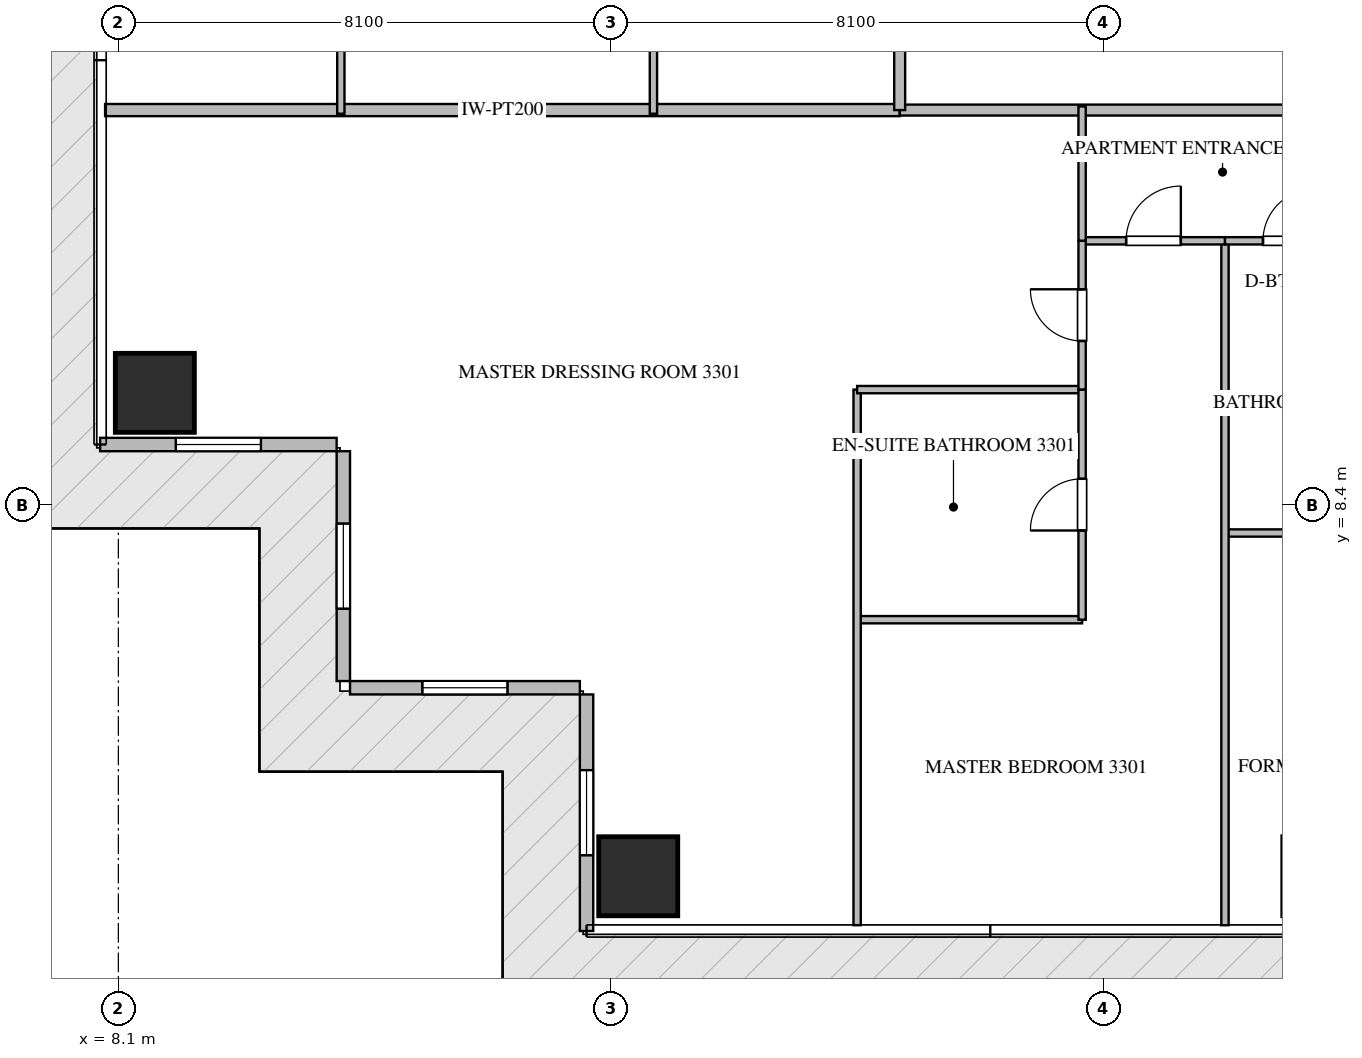
"""IFC4 building model, lengths in metres.
Left out: names, types, materials, properties, quantities, classifications, styles, units other than length and angle.
Written with IfcOpenShell. Run it as: python <this file> out.ifc"""

import sys

from ifc_helpers import new_model, si_unit, direction, frame, frame_2d, origin, origin_2d, place, context, subcontext, project, spatial, rectangle, extrude, source, transform, mapped, element, fill, save


model = new_model("IFC4")
c1 = context("Model", 3, precision=1e-05, world=origin(), true_north=direction((0.0, 1.0)))
c2 = subcontext(c1, "Body", "Model", "MODEL_VIEW")
j1 = project(units=[si_unit("LENGTHUNIT", "METRE"), si_unit("PLANEANGLEUNIT", "RADIAN")], contexts=[c1])
p1 = place(None, origin())
s1 = spatial("IfcSite", under=j1, at=p1, CompositionType="ELEMENT")
p2 = place(p1, origin())
s2 = spatial("IfcBuilding", under=s1, at=p2, CompositionType="ELEMENT")
p3 = place(p2, frame((0.0, 0.0, 135.15)))
s3 = spatial("IfcBuildingStorey", under=s2, at=p3, CompositionType="ELEMENT", Elevation=135.15)
m1 = source(origin(), c2, "Body", "SweptSolid", [
    extrude(rectangle(XDim=1.3, YDim=1.3, at=origin_2d()), origin(), (0.0, 0.0, 1.0), 3.75),
])
for number, where, z_axis, x_axis in (
    (1, (16.65, 2.3, -0.26), (0.0, 0.0, 1.0), (1.0, 0.0, 0.0)),
    (2, (8.7, 10.25, -0.26), (0.0, 0.0, 1.0), (1.0, 0.0, 0.0)),
):
    element("IfcColumn", number, at=place(p3, frame(where, z_axis=z_axis, x_axis=x_axis)), inside=s3, PredefinedType="COLUMN", context=c2, shape_type="MappedRepresentation", body=[
        mapped(m1, transform((0.0, 0.0, 0.0), scale=1.0)),
    ])
p4 = place(p3, frame((7.8, 9.4, 0.0), z_axis=(0.0, 0.0, 1.0), x_axis=(1.0, 0.0, 0.0)))
e3 = element("IfcWall", 3, at=p4, inside=s3, PredefinedType="ELEMENTEDWALL", context=c2, shape_type="SweptSolid", body=[
    extrude(rectangle(XDim=3.89, YDim=0.22, at=frame_2d((1.945, 0.0))), origin(), (0.0, 0.0, 1.0), 3.475),
])
p5 = place(p4, frame((1.245, 0.0, 0.65)))
e4 = element("IfcOpeningElement", 4, at=p5, cuts=e3, PredefinedType="OPENING", context=c2, shape_type="SweptSolid", body=[
    extrude(rectangle(XDim=1.4, YDim=2.05, at=frame_2d((0.7, 1.025))), frame((0.0, 0.12, 0.0), z_axis=(0.0, -1.0, 0.0), x_axis=(1.0, 0.0, 0.0)), (0.0, 0.0, 1.0), 0.24),
])
p6 = place(p3, frame((11.8, 9.29, 0.0), z_axis=(0.0, 0.0, 1.0), x_axis=(0.0, -1.0, 0.0)))
e5 = element("IfcWall", 5, at=p6, inside=s3, PredefinedType="ELEMENTEDWALL", context=c2, shape_type="SweptSolid", body=[
    extrude(rectangle(XDim=3.78, YDim=0.22, at=frame_2d((1.89, 0.0))), origin(), (0.0, 0.0, 1.0), 3.475),
])
p7 = place(p6, frame((1.19, 0.0, 0.65)))
e6 = element("IfcOpeningElement", 6, at=p7, cuts=e5, PredefinedType="OPENING", context=c2, shape_type="SweptSolid", body=[
    extrude(rectangle(XDim=1.4, YDim=2.05, at=frame_2d((0.7, 1.025))), frame((0.0, 0.12, 0.0), z_axis=(0.0, -1.0, 0.0), x_axis=(1.0, 0.0, 0.0)), (0.0, 0.0, 1.0), 0.24),
])
p8 = place(p3, frame((11.91, 5.4, 0.0), z_axis=(0.0, 0.0, 1.0), x_axis=(1.0, 0.0, 0.0)))
e7 = element("IfcWall", 7, at=p8, inside=s3, PredefinedType="ELEMENTEDWALL", context=c2, shape_type="SweptSolid", body=[
    extrude(rectangle(XDim=3.78, YDim=0.22, at=frame_2d((1.89, 0.0))), origin(), (0.0, 0.0, 1.0), 3.475),
])
p9 = place(p8, frame((1.19, 0.0, 0.65)))
e8 = element("IfcOpeningElement", 8, at=p9, cuts=e7, PredefinedType="OPENING", context=c2, shape_type="SweptSolid", body=[
    extrude(rectangle(XDim=1.4, YDim=2.05, at=frame_2d((0.7, 1.025))), frame((0.0, 0.12, 0.0), z_axis=(0.0, -1.0, 0.0), x_axis=(1.0, 0.0, 0.0)), (0.0, 0.0, 1.0), 0.24),
])
p10 = place(p3, frame((15.8, 5.29, 0.0), z_axis=(0.0, 0.0, 1.0), x_axis=(0.0, -1.0, 0.0)))
e9 = element("IfcWall", 9, at=p10, inside=s3, PredefinedType="ELEMENTEDWALL", context=c2, shape_type="SweptSolid", body=[
    extrude(rectangle(XDim=3.89, YDim=0.22, at=frame_2d((1.945, 0.0))), origin(), (0.0, 0.0, 1.0), 3.475),
])
p11 = place(p10, frame((1.245, 0.0, 0.65)))
e10 = element("IfcOpeningElement", 10, at=p11, cuts=e9, PredefinedType="OPENING", context=c2, shape_type="SweptSolid", body=[
    extrude(rectangle(XDim=1.4, YDim=2.05, at=frame_2d((0.7, 1.025))), frame((0.0, 0.12, 0.0), z_axis=(0.0, -1.0, 0.0), x_axis=(1.0, 0.0, 0.0)), (0.0, 0.0, 1.0), 0.24),
])
p12 = place(p3, frame((7.882, 14.9, 0.0), z_axis=(0.0, 0.0, 1.0), x_axis=(1.0, 0.0, 0.0)))
e11 = element("IfcWall", 11, at=p12, inside=s3, PredefinedType="PARTITIONING", context=c2, shape_type="SweptSolid", body=[
    extrude(rectangle(XDim=13.068, YDim=0.2, at=frame_2d((6.534, 0.0))), origin(), (0.0, 0.0, 1.0), 3.49),
])
p13 = place(p3, frame((20.952, 14.9, 0.0), z_axis=(0.0, 0.0, 1.0), x_axis=(1.0, 0.0, 0.0)))
e12 = element("IfcWall", 12, at=p13, inside=s3, PredefinedType="PARTITIONING", context=c2, shape_type="SweptSolid", body=[
    extrude(rectangle(XDim=22.896, YDim=0.18, at=frame_2d((11.448, 0.0))), origin(), (0.0, 0.0, 1.0), 3.49),
])
p14 = place(p13, frame((15.809, 0.0, 0.0)))
e13 = element("IfcOpeningElement", 13, at=p14, cuts=e12, PredefinedType="OPENING", context=c2, shape_type="SweptSolid", body=[
    extrude(rectangle(XDim=1.0, YDim=2.15, at=frame_2d((0.5, 1.075))), frame((0.0, 0.1, 0.0), z_axis=(0.0, -1.0, 0.0), x_axis=(1.0, 0.0, 0.0)), (0.0, 0.0, 1.0), 0.2),
])
p15 = place(p3, frame((20.95, 14.9, 0.0), z_axis=(0.0, 0.0, 1.0), x_axis=(0.0, 1.0, 0.0)))
e14 = element("IfcWall", 14, at=p15, inside=s3, PredefinedType="PARTITIONING", context=c2, shape_type="SweptSolid", body=[
    extrude(rectangle(XDim=18.7, YDim=0.18, at=frame_2d((9.35, 0.0))), origin(), (0.0, 0.0, 1.0), 3.49),
])
p16 = place(p15, frame((14.603, 0.0, 0.0)))
e15 = element("IfcOpeningElement", 15, at=p16, cuts=e14, PredefinedType="OPENING", context=c2, shape_type="SweptSolid", body=[
    extrude(rectangle(XDim=1.0, YDim=2.15, at=frame_2d((0.5, 1.075))), frame((0.0, 0.1, 0.0), z_axis=(0.0, -1.0, 0.0), x_axis=(1.0, 0.0, 0.0)), (0.0, 0.0, 1.0), 0.2),
])
p17 = place(p3, frame((26.3, 7.945, 0.0), z_axis=(0.0, 0.0, 1.0), x_axis=(1.0, 0.0, 0.0)))
e16 = element("IfcWall", 16, at=p17, inside=s3, PredefinedType="PARTITIONING", context=c2, shape_type="SweptSolid", body=[
    extrude(rectangle(XDim=5.24, YDim=0.12, at=frame_2d((2.62, 0.0))), origin(), (0.0, 0.0, 1.0), 3.49),
])
p18 = place(p3, frame((26.3, 1.495, 0.0), z_axis=(0.0, 0.0, 1.0), x_axis=(0.0, 1.0, 0.0)))
e17 = element("IfcWall", 17, at=p18, inside=s3, PredefinedType="PARTITIONING", context=c2, shape_type="SweptSolid", body=[
    extrude(rectangle(XDim=11.255, YDim=0.12, at=frame_2d((5.627, 0.0))), origin(), (0.0, 0.0, 1.0), 3.49),
])
p19 = place(p3, frame((26.3, 12.75, 0.0), z_axis=(0.0, 0.0, 1.0), x_axis=(1.0, 0.0, 0.0)))
e18 = element("IfcWall", 18, at=p19, inside=s3, PredefinedType="PARTITIONING", context=c2, shape_type="SweptSolid", body=[
    extrude(rectangle(XDim=2.1, YDim=0.12, at=frame_2d((1.05, 0.0))), origin(), (0.0, 0.0, 1.0), 3.49),
])
p20 = place(p19, frame((0.625, 0.0, 0.0)))
e19 = element("IfcOpeningElement", 19, at=p20, cuts=e18, PredefinedType="OPENING", context=c2, shape_type="SweptSolid", body=[
    extrude(rectangle(XDim=0.85, YDim=2.1, at=frame_2d((0.425, 1.05))), frame((0.0, 0.07, 0.0), z_axis=(0.0, -1.0, 0.0), x_axis=(1.0, 0.0, 0.0)), (0.0, 0.0, 1.0), 0.14),
])
p21 = place(p3, frame((23.95, 12.75, 0.0), z_axis=(0.0, 0.0, 1.0), x_axis=(1.0, 0.0, 0.0)))
e20 = element("IfcWall", 20, at=p21, inside=s3, PredefinedType="PARTITIONING", context=c2, shape_type="SweptSolid", body=[
    extrude(rectangle(XDim=2.348, YDim=0.12, at=frame_2d((1.174, 0.0))), origin(), (0.0, 0.0, 1.0), 3.49),
])
p22 = place(p21, frame((0.724, 0.0, 0.0)))
e21 = element("IfcOpeningElement", 21, at=p22, cuts=e20, PredefinedType="OPENING", context=c2, shape_type="SweptSolid", body=[
    extrude(rectangle(XDim=0.9, YDim=2.1, at=frame_2d((0.45, 1.05))), frame((0.0, 0.07, 0.0), z_axis=(0.0, -1.0, 0.0), x_axis=(1.0, 0.0, 0.0)), (0.0, 0.0, 1.0), 0.14),
])
p23 = place(p3, frame((20.25, 6.519, 0.0), z_axis=(0.0, 0.0, 1.0), x_axis=(1.0, 0.0, 0.0)))
e22 = element("IfcWall", 22, at=p23, inside=s3, PredefinedType="PARTITIONING", context=c2, shape_type="SweptSolid", body=[
    extrude(rectangle(XDim=3.7, YDim=0.12, at=frame_2d((1.85, 0.0))), origin(), (0.0, 0.0, 1.0), 3.49),
])
p24 = place(p3, frame((20.25, 1.495, 0.0), z_axis=(0.0, 0.0, 1.0), x_axis=(0.0, 1.0, 0.0)))
e23 = element("IfcWall", 23, at=p24, inside=s3, PredefinedType="PARTITIONING", context=c2, shape_type="SweptSolid", body=[
    extrude(rectangle(XDim=8.808, YDim=0.12, at=frame_2d((4.404, 0.0))), origin(), (0.0, 0.0, 1.0), 3.49),
])
p25 = place(p3, frame((20.25, 10.303, 0.0), z_axis=(0.0, 0.0, 1.0), x_axis=(1.0, 0.0, 0.0)))
e24 = element("IfcWall", 24, at=p25, inside=s3, PredefinedType="PARTITIONING", context=c2, shape_type="SweptSolid", body=[
    extrude(rectangle(XDim=3.7, YDim=0.12, at=frame_2d((1.85, 0.0))), origin(), (0.0, 0.0, 1.0), 2.972),
])
p26 = place(p3, frame((23.95, 6.519, 0.0), z_axis=(0.0, 0.0, 1.0), x_axis=(0.0, 1.0, 0.0)))
e25 = element("IfcWall", 25, at=p26, inside=s3, PredefinedType="PARTITIONING", context=c2, shape_type="SweptSolid", body=[
    extrude(rectangle(XDim=3.784, YDim=0.12, at=frame_2d((1.892, 0.0))), origin(), (0.0, 0.0, 1.0), 3.49),
])
p27 = place(p26, frame((1.467, 0.0, 0.0)))
e26 = element("IfcOpeningElement", 26, at=p27, cuts=e25, PredefinedType="OPENING", context=c2, shape_type="SweptSolid", body=[
    extrude(rectangle(XDim=0.85, YDim=2.1, at=frame_2d((0.425, 1.05))), frame((0.0, 0.07, 0.0), z_axis=(0.0, -1.0, 0.0), x_axis=(1.0, 0.0, 0.0)), (0.0, 0.0, 1.0), 0.14),
])
p28 = place(p3, frame((23.95, 10.305, 0.0), z_axis=(0.0, 0.0, 1.0), x_axis=(0.0, 1.0, 0.0)))
e27 = element("IfcWall", 27, at=p28, inside=s3, PredefinedType="PARTITIONING", context=c2, shape_type="SweptSolid", body=[
    extrude(rectangle(XDim=2.445, YDim=0.12, at=frame_2d((1.223, 0.0))), origin(), (0.0, 0.0, 1.0), 3.49),
])
p29 = place(p28, frame((0.798, 0.0, 0.0)))
e28 = element("IfcOpeningElement", 28, at=p29, cuts=e27, PredefinedType="OPENING", context=c2, shape_type="SweptSolid", body=[
    extrude(rectangle(XDim=0.85, YDim=2.1, at=frame_2d((0.425, 1.05))), frame((0.0, 0.07, 0.0), z_axis=(0.0, -1.0, 0.0), x_axis=(1.0, 0.0, 0.0)), (0.0, 0.0, 1.0), 0.14),
])
p30 = place(p3, frame((23.95, 12.752, 0.0), z_axis=(0.0, 0.0, 1.0), x_axis=(0.0, 1.0, 0.0)))
e29 = element("IfcWall", 29, at=p30, inside=s3, PredefinedType="PARTITIONING", context=c2, shape_type="SweptSolid", body=[
    extrude(rectangle(XDim=2.208, YDim=0.12, at=frame_2d((1.104, 0.0))), origin(), (0.0, 0.0, 1.0), 3.49),
])
p31 = place(p3, frame((11.759, 14.84, 0.0), z_axis=(0.0, 0.0, 1.0), x_axis=(0.0, 1.0, 0.0)))
e30 = element("IfcWall", 30, at=p31, inside=s3, PredefinedType="PARTITIONING", context=c2, shape_type="SweptSolid", body=[
    extrude(rectangle(XDim=11.65, YDim=0.12, at=frame_2d((5.825, 0.0))), origin(), (0.0, 0.0, 1.0), 3.49),
])
p32 = place(p3, frame((16.9, 14.84, 0.0), z_axis=(0.0, 0.0, 1.0), x_axis=(0.0, 1.0, 0.0)))
e31 = element("IfcWall", 31, at=p32, inside=s3, PredefinedType="PARTITIONING", context=c2, shape_type="SweptSolid", body=[
    extrude(rectangle(XDim=11.65, YDim=0.12, at=frame_2d((5.825, 0.0))), origin(), (0.0, 0.0, 1.0), 2.972),
])
m2 = source(origin(), c2, "Body", "SweptSolid", [
    extrude(rectangle(XDim=1.4, YDim=2.05, at=frame_2d((0.7, 1.025))), frame((0.0, 0.03, 0.0), z_axis=(0.0, -1.0, 0.0), x_axis=(1.0, 0.0, 0.0)), (0.0, 0.0, 1.0), 0.06),
])
p33 = place(p5, origin())
e32 = element("IfcWindow", 32, at=p33, inside=s3, PartitioningType="SINGLE_PANEL", PredefinedType="WINDOW", context=c2, shape_type="MappedRepresentation", body=[
    mapped(m2, transform((0.0, 0.0, 0.0), scale=1.0)),
])
fill(e4, e32)
p34 = place(p7, origin())
e33 = element("IfcWindow", 33, at=p34, inside=s3, PartitioningType="SINGLE_PANEL", PredefinedType="WINDOW", context=c2, shape_type="MappedRepresentation", body=[
    mapped(m2, transform((0.0, 0.0, 0.0), scale=1.0)),
])
fill(e6, e33)
p35 = place(p9, origin())
e34 = element("IfcWindow", 34, at=p35, inside=s3, PartitioningType="SINGLE_PANEL", PredefinedType="WINDOW", context=c2, shape_type="MappedRepresentation", body=[
    mapped(m2, transform((0.0, 0.0, 0.0), scale=1.0)),
])
fill(e8, e34)
p36 = place(p11, origin())
e35 = element("IfcWindow", 35, at=p36, inside=s3, PartitioningType="SINGLE_PANEL", PredefinedType="WINDOW", context=c2, shape_type="MappedRepresentation", body=[
    mapped(m2, transform((0.0, 0.0, 0.0), scale=1.0)),
])
fill(e10, e35)
m3 = source(origin(), c2, "Body", "SweptSolid", [
    extrude(rectangle(XDim=0.85, YDim=2.1, at=frame_2d((0.425, 1.05))), frame((0.0, 0.025, 0.0), z_axis=(0.0, -1.0, 0.0), x_axis=(1.0, 0.0, 0.0)), (0.0, 0.0, 1.0), 0.05),
])
p37 = place(p20, origin())
e36 = element("IfcDoor", 36, at=p37, inside=s3, OperationType="SINGLE_SWING_RIGHT", PredefinedType="DOOR", context=c2, shape_type="MappedRepresentation", body=[
    mapped(m3, transform((0.0, 0.0, 0.0), scale=1.0)),
])
fill(e19, e36)
m4 = source(origin(), c2, "Body", "SweptSolid", [
    extrude(rectangle(XDim=0.9, YDim=2.1, at=frame_2d((0.45, 1.05))), frame((0.0, 0.025, 0.0), z_axis=(0.0, -1.0, 0.0), x_axis=(1.0, 0.0, 0.0)), (0.0, 0.0, 1.0), 0.05),
])
p38 = place(p22, origin())
e37 = element("IfcDoor", 37, at=p38, inside=s3, OperationType="SINGLE_SWING_RIGHT", PredefinedType="DOOR", context=c2, shape_type="MappedRepresentation", body=[
    mapped(m4, transform((0.0, 0.0, 0.0), scale=1.0)),
])
fill(e21, e37)
p39 = place(p27, origin())
e38 = element("IfcDoor", 38, at=p39, inside=s3, OperationType="SINGLE_SWING_LEFT", PredefinedType="DOOR", context=c2, shape_type="MappedRepresentation", body=[
    mapped(m3, transform((0.0, 0.0, 0.0), scale=1.0)),
])
fill(e26, e38)
p40 = place(p29, origin())
e39 = element("IfcDoor", 39, at=p40, inside=s3, OperationType="SINGLE_SWING_RIGHT", PredefinedType="DOOR", context=c2, shape_type="MappedRepresentation", body=[
    mapped(m3, transform((0.0, 0.0, 0.0), scale=1.0)),
])
fill(e28, e39)
save(model, sys.argv[1])
